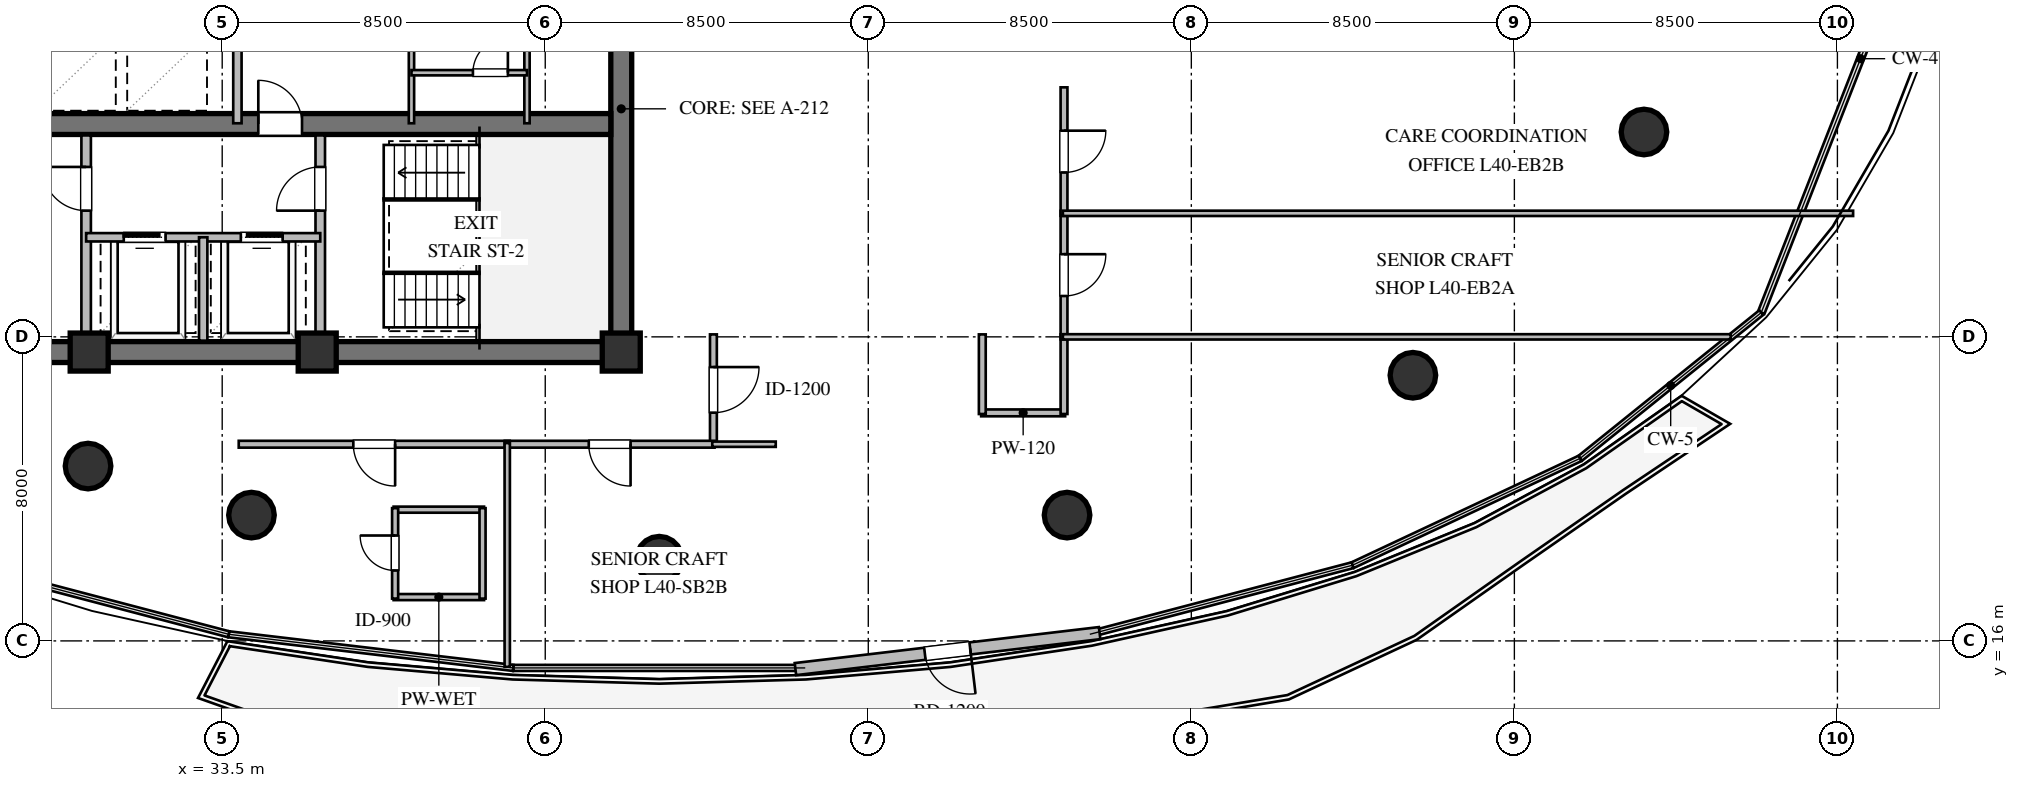
"""IFC4 building model, lengths in metres.
Left out: names, types, materials, properties, quantities, classifications, styles, units other than length and angle.
Written with IfcOpenShell. Run it as: python <this file> out.ifc"""

import sys

from ifc_helpers import new_model, si_unit, direction, frame, frame_2d, origin, origin_2d, place, context, subcontext, project, spatial, rectangle, circle, extrude, element, fill, save


model = new_model("IFC4")
c1 = context("Model", 3, precision=1e-05, world=origin(), true_north=direction((0.0, 1.0)))
c2 = subcontext(c1, "Body", "Model", "MODEL_VIEW")
j1 = project(units=[si_unit("LENGTHUNIT", "METRE"), si_unit("PLANEANGLEUNIT", "RADIAN")], contexts=[c1])
p1 = place(None, origin())
s1 = spatial("IfcSite", under=j1, at=p1, CompositionType="ELEMENT")
p2 = place(p1, origin())
s2 = spatial("IfcBuilding", under=s1, at=p2, CompositionType="ELEMENT")
p3 = place(p2, frame((0.0, 0.0, 153.0)))
s3 = spatial("IfcBuildingStorey", under=s2, at=p3, CompositionType="ELEMENT", Elevation=153.0)
p4 = place(p3, frame((21.725, 23.6, 0.0), z_axis=(0.0, 0.0, 1.0), x_axis=(1.0, 0.0, 0.0)))
e1 = element("IfcWall", 1, at=p4, inside=s3, PredefinedType="SHEAR", context=c2, shape_type="SweptSolid", body=[
    extrude(rectangle(XDim=22.55, YDim=0.55, at=frame_2d((11.275, 0.0))), origin(), (0.0, 0.0, 1.0), 3.36),
])
p5 = place(p3, frame((44.0, 23.875, 0.0), z_axis=(0.0, 0.0, 1.0), x_axis=(0.0, 1.0, 0.0)))
e2 = element("IfcWall", 2, at=p5, inside=s3, PredefinedType="SHEAR", context=c2, shape_type="SweptSolid", body=[
    extrude(rectangle(XDim=12.25, YDim=0.55, at=frame_2d((6.125, 0.0))), origin(), (0.0, 0.0, 1.0), 3.36),
])
p6 = place(p5, frame((8.725, 0.0, 0.0)))
e3 = element("IfcOpeningElement", 3, at=p6, cuts=e2, PredefinedType="OPENING", context=c2, shape_type="SweptSolid", body=[
    extrude(rectangle(XDim=1.5, YDim=2.15, at=frame_2d((0.75, 1.075))), frame((0.0, 0.285, 0.0), z_axis=(0.0, -1.0, 0.0), x_axis=(1.0, 0.0, 0.0)), (0.0, 0.0, 1.0), 0.57),
])
p7 = place(p3, frame((22.275, 29.6, 0.0), z_axis=(0.0, 0.0, 1.0), x_axis=(1.0, 0.0, 0.0)))
e4 = element("IfcWall", 4, at=p7, inside=s3, PredefinedType="SHEAR", context=c2, shape_type="SweptSolid", body=[
    extrude(rectangle(XDim=21.45, YDim=0.55, at=frame_2d((10.725, 0.0))), origin(), (0.0, 0.0, 1.0), 3.36),
])
p8 = place(p7, frame((12.175, 0.0, 0.0)))
e5 = element("IfcOpeningElement", 5, at=p8, cuts=e4, PredefinedType="OPENING", context=c2, shape_type="SweptSolid", body=[
    extrude(rectangle(XDim=1.15, YDim=2.1, at=frame_2d((0.575, 1.05))), frame((0.0, 0.285, 0.0), z_axis=(0.0, -1.0, 0.0), x_axis=(1.0, 0.0, 0.0)), (0.0, 0.0, 1.0), 0.57),
])
for number, where, z_axis, x_axis in (
    (6, (30.0, 23.6, 0.0), (0.0, 0.0, 1.0), (1.0, 0.0, 0.0)),
    (7, (36.0, 23.6, 0.0), (0.0, 0.0, 1.0), (1.0, 0.0, 0.0)),
    (8, (44.0, 23.6, 0.0), (0.0, 0.0, 1.0), (1.0, 0.0, 0.0)),
):
    element("IfcColumn", number, at=place(p3, frame(where, z_axis=z_axis, x_axis=x_axis)), inside=s3, PredefinedType="COLUMN", context=c2, shape_type="SweptSolid", body=[
        extrude(rectangle(XDim=1.0, YDim=1.0, at=origin_2d()), origin(), (0.0, 0.0, 1.0), 3.6),
    ])
for number, where, z_axis, x_axis in (
    (9, (29.97, 20.6, 0.0), (0.0, 0.0, 1.0), (1.0, 0.0, 0.0)),
    (10, (34.27, 19.31, 0.0), (0.0, 0.0, 1.0), (1.0, 0.0, 0.0)),
    (11, (45.0, 18.15, 0.0), (0.0, 0.0, 1.0), (1.0, 0.0, 0.0)),
    (12, (55.73, 19.31, 0.0), (0.0, 0.0, 1.0), (1.0, 0.0, 0.0)),
    (13, (64.83, 22.99, 0.0), (0.0, 0.0, 1.0), (1.0, 0.0, 0.0)),
    (14, (70.91, 29.39, 0.0), (0.0, 0.0, 1.0), (1.0, 0.0, 0.0)),
):
    element("IfcColumn", number, at=place(p3, frame(where, z_axis=z_axis, x_axis=x_axis)), inside=s3, PredefinedType="COLUMN", context=c2, shape_type="SweptSolid", body=[
        extrude(circle(Radius=0.6, at=origin_2d()), origin(), (0.0, 0.0, 1.0), 3.6),
    ])
p9 = place(p3, frame((56.587, 16.205, 0.0), z_axis=(0.0, 0.0, 1.0), x_axis=(-0.993072847957, -0.117500292131, 0.0)))
e15 = element("IfcWall", 15, at=p9, inside=s3, PredefinedType="STANDARD", context=c2, shape_type="SweptSolid", body=[
    extrude(rectangle(XDim=8.06, YDim=0.32, at=frame_2d((4.03, 0.0))), origin(), (0.0, 0.0, 1.0), 3.36),
])
p10 = place(p9, frame((3.43, 0.0, 0.0)))
e16 = element("IfcOpeningElement", 16, at=p10, cuts=e15, PredefinedType="OPENING", context=c2, shape_type="SweptSolid", body=[
    extrude(rectangle(XDim=1.2, YDim=2.15, at=frame_2d((0.6, 1.075))), frame((0.0, 0.17, 0.0), z_axis=(0.0, -1.0, 0.0), x_axis=(1.0, 0.0, 0.0)), (0.0, 0.0, 1.0), 0.34),
])
p11 = place(p3, frame((29.92, 23.9, 0.0), z_axis=(0.0, 0.0, 1.0), x_axis=(0.0, 1.0, 0.0)))
e17 = element("IfcWall", 17, at=p11, inside=s3, PredefinedType="SOLIDWALL", context=c2, shape_type="SweptSolid", body=[
    extrude(rectangle(XDim=5.4, YDim=0.25, at=frame_2d((2.7, 0.0))), origin(), (0.0, 0.0, 1.0), 2.806),
])
p12 = place(p11, frame((3.421, 0.0, 0.0)))
e18 = element("IfcOpeningElement", 18, at=p12, cuts=e17, PredefinedType="OPENING", context=c2, shape_type="SweptSolid", body=[
    extrude(rectangle(XDim=1.15, YDim=2.1, at=frame_2d((0.575, 1.05))), frame((0.0, 0.135, 0.0), z_axis=(0.0, -1.0, 0.0), x_axis=(1.0, 0.0, 0.0)), (0.0, 0.0, 1.0), 0.27),
])
p13 = place(p3, frame((36.08, 23.9, 0.0), z_axis=(0.0, 0.0, 1.0), x_axis=(0.0, 1.0, 0.0)))
e19 = element("IfcWall", 19, at=p13, inside=s3, PredefinedType="SOLIDWALL", context=c2, shape_type="SweptSolid", body=[
    extrude(rectangle(XDim=5.4, YDim=0.25, at=frame_2d((2.7, 0.0))), origin(), (0.0, 0.0, 1.0), 3.36),
])
p14 = place(p13, frame((3.421, 0.0, 0.0)))
e20 = element("IfcOpeningElement", 20, at=p14, cuts=e19, PredefinedType="OPENING", context=c2, shape_type="SweptSolid", body=[
    extrude(rectangle(XDim=1.15, YDim=2.1, at=frame_2d((0.575, 1.05))), frame((0.0, 0.135, 0.0), z_axis=(0.0, -1.0, 0.0), x_axis=(1.0, 0.0, 0.0)), (0.0, 0.0, 1.0), 0.27),
])
p15 = place(p3, frame((29.92, 26.62, 0.0), z_axis=(0.0, 0.0, 1.0), x_axis=(1.0, 0.0, 0.0)))
e21 = element("IfcWall", 21, at=p15, inside=s3, PredefinedType="SOLIDWALL", context=c2, shape_type="SweptSolid", body=[
    extrude(rectangle(XDim=6.16, YDim=0.22, at=frame_2d((3.08, 0.0))), origin(), (0.0, 0.0, 1.0), 3.36),
])
p16 = place(p15, frame((0.99, 0.0, 0.0)))
e22 = element("IfcOpeningElement", 22, at=p16, cuts=e21, PredefinedType="OPENING", context=c2, shape_type="SweptSolid", body=[
    extrude(rectangle(XDim=1.1, YDim=2.1, at=frame_2d((0.55, 1.05))), frame((0.0, 0.12, 0.0), z_axis=(0.0, -1.0, 0.0), x_axis=(1.0, 0.0, 0.0)), (0.0, 0.0, 1.0), 0.24),
])
p17 = place(p15, frame((4.07, 0.0, 0.0)))
e23 = element("IfcOpeningElement", 23, at=p17, cuts=e21, PredefinedType="OPENING", context=c2, shape_type="SweptSolid", body=[
    extrude(rectangle(XDim=1.1, YDim=2.1, at=frame_2d((0.55, 1.05))), frame((0.0, 0.12, 0.0), z_axis=(0.0, -1.0, 0.0), x_axis=(1.0, 0.0, 0.0)), (0.0, 0.0, 1.0), 0.24),
])
p18 = place(p3, frame((33.0, 23.9, 0.0), z_axis=(0.0, 0.0, 1.0), x_axis=(0.0, 1.0, 0.0)))
e24 = element("IfcWall", 24, at=p18, inside=s3, PredefinedType="SOLIDWALL", context=c2, shape_type="SweptSolid", body=[
    extrude(rectangle(XDim=2.72, YDim=0.22, at=frame_2d((1.36, 0.0))), origin(), (0.0, 0.0, 1.0), 3.36),
])
p19 = place(p3, frame((33.9, 29.62, 0.0), z_axis=(0.0, 0.0, 1.0), x_axis=(0.0, 1.0, 0.0)))
e25 = element("IfcWall", 25, at=p19, inside=s3, PredefinedType="SOLIDWALL", context=c2, shape_type="SweptSolid", body=[
    extrude(rectangle(XDim=2.36, YDim=0.22, at=frame_2d((1.18, 0.0))), origin(), (0.0, 0.0, 1.0), 3.36),
])
for number, where, z_axis, x_axis in (
    (26, (38.48, 29.62, 0.0), (0.0, 0.0, 1.0), (0.0, 1.0, 0.0)),
    (27, (41.52, 29.62, 0.0), (0.0, 0.0, 1.0), (0.0, 1.0, 0.0)),
):
    element("IfcWall", number, at=place(p3, frame(where, z_axis=z_axis, x_axis=x_axis)), inside=s3, PredefinedType="PARTITIONING", context=c2, shape_type="SweptSolid", body=[
        extrude(rectangle(XDim=2.36, YDim=0.14, at=frame_2d((1.18, 0.0))), origin(), (0.0, 0.0, 1.0), 3.36),
    ])
p20 = place(p3, frame((38.48, 30.95, 0.0), z_axis=(0.0, 0.0, 1.0), x_axis=(1.0, 0.0, 0.0)))
e28 = element("IfcWall", 28, at=p20, inside=s3, PredefinedType="PARTITIONING", context=c2, shape_type="SweptSolid", body=[
    extrude(rectangle(XDim=3.04, YDim=0.14, at=frame_2d((1.52, 0.0))), origin(), (0.0, 0.0, 1.0), 3.36),
])
p21 = place(p20, frame((1.617, 0.0, 0.0)))
e29 = element("IfcOpeningElement", 29, at=p21, cuts=e28, PredefinedType="OPENING", context=c2, shape_type="SweptSolid", body=[
    extrude(rectangle(XDim=0.92, YDim=2.1, at=frame_2d((0.46, 1.05))), frame((0.0, 0.08, 0.0), z_axis=(0.0, -1.0, 0.0), x_axis=(1.0, 0.0, 0.0)), (0.0, 0.0, 1.0), 0.16),
])
p22 = place(p3, frame((38.01, 17.153, 0.0), z_axis=(0.0, 0.0, 1.0), x_axis=(1.0, 0.0, 0.0)))
e30 = element("IfcWall", 30, at=p22, inside=s3, PredefinedType="PLUMBINGWALL", context=c2, shape_type="SweptSolid", body=[
    extrude(rectangle(XDim=2.38, YDim=0.16, at=frame_2d((1.19, 0.0))), origin(), (0.0, 0.0, 1.0), 3.36),
])
p23 = place(p3, frame((38.01, 19.453, 0.0), z_axis=(0.0, 0.0, 1.0), x_axis=(1.0, 0.0, 0.0)))
e31 = element("IfcWall", 31, at=p23, inside=s3, PredefinedType="PLUMBINGWALL", context=c2, shape_type="SweptSolid", body=[
    extrude(rectangle(XDim=2.38, YDim=0.16, at=frame_2d((1.19, 0.0))), origin(), (0.0, 0.0, 1.0), 2.657),
])
p24 = place(p3, frame((38.05, 17.113, 0.0), z_axis=(0.0, 0.0, 1.0), x_axis=(0.0, 1.0, 0.0)))
e32 = element("IfcWall", 32, at=p24, inside=s3, PredefinedType="PLUMBINGWALL", context=c2, shape_type="SweptSolid", body=[
    extrude(rectangle(XDim=2.38, YDim=0.16, at=frame_2d((1.19, 0.0))), origin(), (0.0, 0.0, 1.0), 3.36),
])
p25 = place(p24, frame((0.74, 0.0, 0.0)))
e33 = element("IfcOpeningElement", 33, at=p25, cuts=e32, PredefinedType="OPENING", context=c2, shape_type="SweptSolid", body=[
    extrude(rectangle(XDim=0.92, YDim=2.1, at=frame_2d((0.46, 1.05))), frame((0.0, 0.09, 0.0), z_axis=(0.0, -1.0, 0.0), x_axis=(1.0, 0.0, 0.0)), (0.0, 0.0, 1.0), 0.18),
])
p26 = place(p3, frame((40.35, 17.113, 0.0), z_axis=(0.0, 0.0, 1.0), x_axis=(0.0, 1.0, 0.0)))
e34 = element("IfcWall", 34, at=p26, inside=s3, PredefinedType="PLUMBINGWALL", context=c2, shape_type="SweptSolid", body=[
    extrude(rectangle(XDim=2.38, YDim=0.16, at=frame_2d((1.19, 0.0))), origin(), (0.0, 0.0, 1.0), 3.36),
])
p27 = place(p3, frame((46.425, 24.065, 0.0), z_axis=(0.0, 0.0, 1.0), x_axis=(0.0, -1.0, 0.0)))
e35 = element("IfcWall", 35, at=p27, inside=s3, PredefinedType="PARTITIONING", context=c2, shape_type="SweptSolid", body=[
    extrude(rectangle(XDim=2.92, YDim=0.18, at=frame_2d((1.46, 0.0))), origin(), (0.0, 0.0, 1.0), 3.36),
])
p28 = place(p27, frame((0.86, 0.0, 0.0)))
e36 = element("IfcOpeningElement", 36, at=p28, cuts=e35, PredefinedType="OPENING", context=c2, shape_type="SweptSolid", body=[
    extrude(rectangle(XDim=1.2, YDim=2.15, at=frame_2d((0.6, 1.075))), frame((0.0, 0.1, 0.0), z_axis=(0.0, -1.0, 0.0), x_axis=(1.0, 0.0, 0.0)), (0.0, 0.0, 1.0), 0.2),
])
p29 = place(p3, frame((55.68, 22.0, 0.0), z_axis=(0.0, 0.0, 1.0), x_axis=(-1.0, 0.0, 0.0)))
e37 = element("IfcWall", 37, at=p29, inside=s3, PredefinedType="PARTITIONING", context=c2, shape_type="SweptSolid", body=[
    extrude(rectangle(XDim=2.21, YDim=0.18, at=frame_2d((1.105, 0.0))), origin(), (0.0, 0.0, 1.0), 3.36),
])
for number, where, z_axis, x_axis in (
    (38, (55.65, 24.065, 0.0), (0.0, 0.0, 1.0), (0.0, -1.0, 0.0)),
    (39, (53.5, 21.97, 0.0), (0.0, 0.0, 1.0), (0.0, 1.0, 0.0)),
):
    element("IfcWall", number, at=place(p3, frame(where, z_axis=z_axis, x_axis=x_axis)), inside=s3, PredefinedType="PARTITIONING", context=c2, shape_type="SweptSolid", body=[
        extrude(rectangle(XDim=2.095, YDim=0.18, at=frame_2d((1.047, 0.0))), origin(), (0.0, 0.0, 1.0), 3.36),
    ])
p30 = place(p3, frame((55.65, 27.315, 0.0), z_axis=(0.0, 0.0, 1.0), x_axis=(0.0, -1.0, 0.0)))
e40 = element("IfcWall", 40, at=p30, inside=s3, PredefinedType="PARTITIONING", context=c2, shape_type="SweptSolid", body=[
    extrude(rectangle(XDim=3.38, YDim=0.18, at=frame_2d((1.69, 0.0))), origin(), (0.0, 0.0, 1.0), 3.36),
])
p31 = place(p30, frame((1.14, 0.0, 0.0)))
e41 = element("IfcOpeningElement", 41, at=p31, cuts=e40, PredefinedType="OPENING", context=c2, shape_type="SweptSolid", body=[
    extrude(rectangle(XDim=1.1, YDim=2.1, at=frame_2d((0.55, 1.05))), frame((0.0, 0.1, 0.0), z_axis=(0.0, -1.0, 0.0), x_axis=(1.0, 0.0, 0.0)), (0.0, 0.0, 1.0), 0.2),
])
p32 = place(p3, frame((55.65, 30.565, 0.0), z_axis=(0.0, 0.0, 1.0), x_axis=(0.0, -1.0, 0.0)))
e42 = element("IfcWall", 42, at=p32, inside=s3, PredefinedType="PARTITIONING", context=c2, shape_type="SweptSolid", body=[
    extrude(rectangle(XDim=3.38, YDim=0.18, at=frame_2d((1.69, 0.0))), origin(), (0.0, 0.0, 1.0), 3.36),
])
p33 = place(p32, frame((1.14, 0.0, 0.0)))
e43 = element("IfcOpeningElement", 43, at=p33, cuts=e42, PredefinedType="OPENING", context=c2, shape_type="SweptSolid", body=[
    extrude(rectangle(XDim=1.1, YDim=2.1, at=frame_2d((0.55, 1.05))), frame((0.0, 0.1, 0.0), z_axis=(0.0, -1.0, 0.0), x_axis=(1.0, 0.0, 0.0)), (0.0, 0.0, 1.0), 0.2),
])
p34 = place(p3, frame((41.065, 21.175, 0.0), z_axis=(0.0, 0.0, 1.0), x_axis=(-1.0, 0.0, 0.0)))
e44 = element("IfcWall", 44, at=p34, inside=s3, PredefinedType="PARTITIONING", context=c2, shape_type="SweptSolid", body=[
    extrude(rectangle(XDim=7.13, YDim=0.18, at=frame_2d((3.565, 0.0))), origin(), (0.0, 0.0, 1.0), 2.996),
])
p35 = place(p34, frame((3.015, 0.0, 0.0)))
e45 = element("IfcOpeningElement", 45, at=p35, cuts=e44, PredefinedType="OPENING", context=c2, shape_type="SweptSolid", body=[
    extrude(rectangle(XDim=1.1, YDim=2.1, at=frame_2d((0.55, 1.05))), frame((0.0, 0.1, 0.0), z_axis=(0.0, -1.0, 0.0), x_axis=(1.0, 0.0, 0.0)), (0.0, 0.0, 1.0), 0.2),
])
p36 = place(p3, frame((46.455, 21.175, 0.0), z_axis=(0.0, 0.0, 1.0), x_axis=(-1.0, 0.0, 0.0)))
e46 = element("IfcWall", 46, at=p36, inside=s3, PredefinedType="PARTITIONING", context=c2, shape_type="SweptSolid", body=[
    extrude(rectangle(XDim=5.52, YDim=0.18, at=frame_2d((2.76, 0.0))), origin(), (0.0, 0.0, 1.0), 2.996),
])
p37 = place(p36, frame((2.21, 0.0, 0.0)))
e47 = element("IfcOpeningElement", 47, at=p37, cuts=e46, PredefinedType="OPENING", context=c2, shape_type="SweptSolid", body=[
    extrude(rectangle(XDim=1.1, YDim=2.1, at=frame_2d((0.55, 1.05))), frame((0.0, 0.1, 0.0), z_axis=(0.0, -1.0, 0.0), x_axis=(1.0, 0.0, 0.0)), (0.0, 0.0, 1.0), 0.2),
])
p38 = place(p3, frame((55.62, 24.0, 0.0), z_axis=(0.0, 0.0, 1.0), x_axis=(1.0, 0.0, 0.0)))
e48 = element("IfcWall", 48, at=p38, inside=s3, PredefinedType="PARTITIONING", context=c2, shape_type="SweptSolid", body=[
    extrude(rectangle(XDim=17.573, YDim=0.14, at=frame_2d((8.787, 0.0))), origin(), (0.0, 0.0, 1.0), 3.36),
])
p39 = place(p3, frame((48.065, 21.175, 0.0), z_axis=(0.0, 0.0, 1.0), x_axis=(-1.0, 0.0, 0.0)))
e49 = element("IfcWall", 49, at=p39, inside=s3, PredefinedType="PARTITIONING", context=c2, shape_type="SweptSolid", body=[
    extrude(rectangle(XDim=1.67, YDim=0.14, at=frame_2d((0.835, 0.0))), origin(), (0.0, 0.0, 1.0), 2.996),
])
p40 = place(p3, frame((55.62, 27.25, 0.0), z_axis=(0.0, 0.0, 1.0), x_axis=(1.0, 0.0, 0.0)))
e50 = element("IfcWall", 50, at=p40, inside=s3, PredefinedType="PARTITIONING", context=c2, shape_type="SweptSolid", body=[
    extrude(rectangle(XDim=20.793, YDim=0.14, at=frame_2d((10.396, 0.0))), origin(), (0.0, 0.0, 1.0), 2.806),
])
p41 = place(p3, frame((41.0, 21.205, 0.0), z_axis=(0.0, 0.0, 1.0), x_axis=(0.0, -1.0, 0.0)))
e51 = element("IfcWall", 51, at=p41, inside=s3, PredefinedType="PARTITIONING", context=c2, shape_type="SweptSolid", body=[
    extrude(rectangle(XDim=5.887, YDim=0.14, at=frame_2d((2.944, 0.0))), origin(), (0.0, 0.0, 1.0), 3.36),
])
p42 = place(p10, origin())
e52 = element("IfcDoor", 52, at=p42, inside=s3, OperationType="SINGLE_SWING_LEFT", PredefinedType="DOOR", context=c2, shape_type="SweptSolid", body=[
    extrude(rectangle(XDim=1.2, YDim=2.15, at=frame_2d((0.6, 1.075))), frame((0.0, 0.025, 0.0), z_axis=(0.0, -1.0, 0.0), x_axis=(1.0, 0.0, 0.0)), (0.0, 0.0, 1.0), 0.05),
])
fill(e16, e52)
p43 = place(p12, origin())
e53 = element("IfcDoor", 53, at=p43, inside=s3, OperationType="SINGLE_SWING_RIGHT", PredefinedType="DOOR", context=c2, shape_type="SweptSolid", body=[
    extrude(rectangle(XDim=1.15, YDim=2.1, at=frame_2d((0.575, 1.05))), frame((0.0, 0.025, 0.0), z_axis=(0.0, -1.0, 0.0), x_axis=(1.0, 0.0, 0.0)), (0.0, 0.0, 1.0), 0.05),
])
fill(e18, e53)
p44 = place(p14, origin())
e54 = element("IfcDoor", 54, at=p44, inside=s3, OperationType="SINGLE_SWING_LEFT", PredefinedType="DOOR", context=c2, shape_type="SweptSolid", body=[
    extrude(rectangle(XDim=1.15, YDim=2.1, at=frame_2d((0.575, 1.05))), frame((0.0, 0.025, 0.0), z_axis=(0.0, -1.0, 0.0), x_axis=(1.0, 0.0, 0.0)), (0.0, 0.0, 1.0), 0.05),
])
fill(e20, e54)
p45 = place(p16, origin())
e55 = element("IfcDoor", 55, at=p45, inside=s3, OperationType="SLIDING_TO_LEFT", PredefinedType="DOOR", context=c2, shape_type="SweptSolid", body=[
    extrude(rectangle(XDim=1.1, YDim=2.1, at=frame_2d((0.55, 1.05))), frame((0.0, 0.025, 0.0), z_axis=(0.0, -1.0, 0.0), x_axis=(1.0, 0.0, 0.0)), (0.0, 0.0, 1.0), 0.05),
])
fill(e22, e55)
p46 = place(p17, origin())
e56 = element("IfcDoor", 56, at=p46, inside=s3, OperationType="SLIDING_TO_RIGHT", PredefinedType="DOOR", context=c2, shape_type="SweptSolid", body=[
    extrude(rectangle(XDim=1.1, YDim=2.1, at=frame_2d((0.55, 1.05))), frame((0.0, 0.025, 0.0), z_axis=(0.0, -1.0, 0.0), x_axis=(1.0, 0.0, 0.0)), (0.0, 0.0, 1.0), 0.05),
])
fill(e23, e56)
p47 = place(p8, origin())
e57 = element("IfcDoor", 57, at=p47, inside=s3, OperationType="SINGLE_SWING_LEFT", PredefinedType="DOOR", context=c2, shape_type="SweptSolid", body=[
    extrude(rectangle(XDim=1.15, YDim=2.1, at=frame_2d((0.575, 1.05))), frame((0.0, 0.025, 0.0), z_axis=(0.0, -1.0, 0.0), x_axis=(1.0, 0.0, 0.0)), (0.0, 0.0, 1.0), 0.05),
])
fill(e5, e57)
p48 = place(p21, origin())
e58 = element("IfcDoor", 58, at=p48, inside=s3, OperationType="SINGLE_SWING_RIGHT", PredefinedType="DOOR", context=c2, shape_type="SweptSolid", body=[
    extrude(rectangle(XDim=0.92, YDim=2.1, at=frame_2d((0.46, 1.05))), frame((0.0, 0.025, 0.0), z_axis=(0.0, -1.0, 0.0), x_axis=(1.0, 0.0, 0.0)), (0.0, 0.0, 1.0), 0.05),
])
fill(e29, e58)
p49 = place(p25, origin())
e59 = element("IfcDoor", 59, at=p49, inside=s3, OperationType="SINGLE_SWING_RIGHT", PredefinedType="DOOR", context=c2, shape_type="SweptSolid", body=[
    extrude(rectangle(XDim=0.92, YDim=2.1, at=frame_2d((0.46, 1.05))), frame((0.0, 0.025, 0.0), z_axis=(0.0, -1.0, 0.0), x_axis=(1.0, 0.0, 0.0)), (0.0, 0.0, 1.0), 0.05),
])
fill(e33, e59)
p50 = place(p28, origin())
e60 = element("IfcDoor", 60, at=p50, inside=s3, OperationType="SINGLE_SWING_LEFT", PredefinedType="DOOR", context=c2, shape_type="SweptSolid", body=[
    extrude(rectangle(XDim=1.2, YDim=2.15, at=frame_2d((0.6, 1.075))), frame((0.0, 0.025, 0.0), z_axis=(0.0, -1.0, 0.0), x_axis=(1.0, 0.0, 0.0)), (0.0, 0.0, 1.0), 0.05),
])
fill(e36, e60)
p51 = place(p31, origin())
e61 = element("IfcDoor", 61, at=p51, inside=s3, OperationType="SINGLE_SWING_LEFT", PredefinedType="DOOR", context=c2, shape_type="SweptSolid", body=[
    extrude(rectangle(XDim=1.1, YDim=2.1, at=frame_2d((0.55, 1.05))), frame((0.0, 0.025, 0.0), z_axis=(0.0, -1.0, 0.0), x_axis=(1.0, 0.0, 0.0)), (0.0, 0.0, 1.0), 0.05),
])
fill(e41, e61)
p52 = place(p33, origin())
e62 = element("IfcDoor", 62, at=p52, inside=s3, OperationType="SINGLE_SWING_LEFT", PredefinedType="DOOR", context=c2, shape_type="SweptSolid", body=[
    extrude(rectangle(XDim=1.1, YDim=2.1, at=frame_2d((0.55, 1.05))), frame((0.0, 0.025, 0.0), z_axis=(0.0, -1.0, 0.0), x_axis=(1.0, 0.0, 0.0)), (0.0, 0.0, 1.0), 0.05),
])
fill(e43, e62)
p53 = place(p35, origin())
e63 = element("IfcDoor", 63, at=p53, inside=s3, OperationType="SINGLE_SWING_LEFT", PredefinedType="DOOR", context=c2, shape_type="SweptSolid", body=[
    extrude(rectangle(XDim=1.1, YDim=2.1, at=frame_2d((0.55, 1.05))), frame((0.0, 0.025, 0.0), z_axis=(0.0, -1.0, 0.0), x_axis=(1.0, 0.0, 0.0)), (0.0, 0.0, 1.0), 0.05),
])
fill(e45, e63)
p54 = place(p37, origin())
e64 = element("IfcDoor", 64, at=p54, inside=s3, OperationType="SINGLE_SWING_LEFT", PredefinedType="DOOR", context=c2, shape_type="SweptSolid", body=[
    extrude(rectangle(XDim=1.1, YDim=2.1, at=frame_2d((0.55, 1.05))), frame((0.0, 0.025, 0.0), z_axis=(0.0, -1.0, 0.0), x_axis=(1.0, 0.0, 0.0)), (0.0, 0.0, 1.0), 0.05),
])
fill(e47, e64)
save(model, sys.argv[1])
